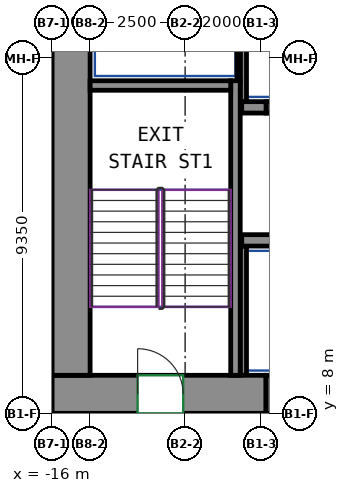
"""IFC4 building model, lengths in metres.
Left out: names, types, materials, properties, quantities, classifications, styles, units other than length and angle.
Written with IfcOpenShell. Run it as: python <this file> out.ifc"""

import sys

from ifc_helpers import new_model, si_unit, direction, frame, frame_2d, origin, place, context, subcontext, project, spatial, rectangle, extrude, source, transform, mapped, element, fill, save


model = new_model("IFC4")
c1 = context("Model", 3, precision=1e-05, world=origin(), true_north=direction((0.0, 1.0)))
c2 = subcontext(c1, "Body", "Model", "MODEL_VIEW")
j1 = project(units=[si_unit("LENGTHUNIT", "METRE"), si_unit("PLANEANGLEUNIT", "RADIAN")], contexts=[c1])
p1 = place(None, origin())
s1 = spatial("IfcSite", under=j1, at=p1, CompositionType="ELEMENT")
p2 = place(p1, origin())
s2 = spatial("IfcBuilding", under=s1, at=p2, CompositionType="ELEMENT")
p3 = place(p2, frame((0.0, 0.0, 71.2)))
s3 = spatial("IfcBuildingStorey", under=s2, at=p3, CompositionType="ELEMENT", Elevation=71.2)
m1 = source(origin(), c2, "Body", "SweptSolid", [
    extrude(rectangle(XDim=5.63, YDim=1.0, at=frame_2d((2.815, 0.0))), origin(), (0.0, 0.0, 1.0), 3.72),
])
p4 = place(p3, frame((-16.0, 8.5, 0.0), z_axis=(0.0, 0.0, 1.0), x_axis=(1.0, 0.0, 0.0)))
e1 = element("IfcWall", 1, at=p4, inside=s3, PredefinedType="SHEAR", context=c2, shape_type="MappedRepresentation", body=[
    mapped(m1, transform((0.0, 0.0, 0.0))),
])
p5 = place(p4, frame((2.25, 0.0, 0.0)))
e2 = element("IfcOpeningElement", 2, at=p5, cuts=e1, PredefinedType="OPENING", context=c2, shape_type="SweptSolid", body=[
    extrude(rectangle(XDim=1.2, YDim=2.1, at=frame_2d((0.6, 1.05))), frame((0.0, 0.51, 0.0), z_axis=(0.0, -1.0, 0.0), x_axis=(1.0, 0.0, 0.0)), (0.0, 0.0, 1.0), 1.02),
])
m2 = source(origin(), c2, "Body", "SweptSolid", [
    extrude(rectangle(XDim=12.0, YDim=1.0, at=frame_2d((6.0, 0.0))), origin(), (0.0, 0.0, 1.0), 3.72),
])
p6 = place(p3, frame((-15.5, 9.0, 0.0), z_axis=(0.0, 0.0, 1.0), x_axis=(0.0, 1.0, 0.0)))
e3 = element("IfcWall", 3, at=p6, inside=s3, PredefinedType="SHEAR", context=c2, shape_type="MappedRepresentation", body=[
    mapped(m2, transform((0.0, 0.0, 0.0))),
])
m3 = source(origin(), c2, "Body", "SweptSolid", [
    extrude(rectangle(XDim=7.75, YDim=0.25, at=frame_2d((3.875, 0.0))), origin(), (0.0, 0.0, 1.0), 3.72),
])
p7 = place(p3, frame((-11.175, 9.0, 0.0), z_axis=(0.0, 0.0, 1.0), x_axis=(0.0, 1.0, 0.0)))
e4 = element("IfcWall", 4, at=p7, inside=s3, PredefinedType="SHEAR", context=c2, shape_type="MappedRepresentation", body=[
    mapped(m3, transform((0.0, 0.0, 0.0))),
])
m4 = source(origin(), c2, "Body", "SweptSolid", [
    extrude(rectangle(XDim=3.7, YDim=0.25, at=frame_2d((1.85, 0.0))), origin(), (0.0, 0.0, 1.0), 3.72),
])
p8 = place(p3, frame((-15.0, 16.625, 0.0), z_axis=(0.0, 0.0, 1.0), x_axis=(1.0, 0.0, 0.0)))
e5 = element("IfcWall", 5, at=p8, inside=s3, PredefinedType="SHEAR", context=c2, shape_type="MappedRepresentation", body=[
    mapped(m4, transform((0.0, 0.0, 0.0))),
])
m5 = source(origin(), c2, "Body", "SweptSolid", [
    extrude(rectangle(XDim=6.0, YDim=0.3, at=frame_2d((3.0, 0.0))), origin(), (0.0, 0.0, 1.0), 3.72),
])
p9 = place(p3, frame((-11.01, 12.55, 0.0), z_axis=(0.0, 0.0, 1.0), x_axis=(1.0, 0.0, 0.0)))
e6 = element("IfcWall", 6, at=p9, inside=s3, PredefinedType="SHEAR", context=c2, shape_type="MappedRepresentation", body=[
    mapped(m5, transform((0.0, 0.0, 0.0))),
])
m6 = source(origin(), c2, "Body", "SweptSolid", [
    extrude(rectangle(XDim=0.64, YDim=0.3, at=frame_2d((0.32, 0.0))), origin(), (0.0, 0.0, 1.0), 3.72),
])
p10 = place(p3, frame((-11.01, 16.05, 0.0), z_axis=(0.0, 0.0, 1.0), x_axis=(1.0, 0.0, 0.0)))
e7 = element("IfcWall", 7, at=p10, inside=s3, PredefinedType="SHEAR", context=c2, shape_type="MappedRepresentation", body=[
    mapped(m6, transform((0.0, 0.0, 0.0))),
])
m7 = source(origin(), c2, "Body", "SweptSolid", [
    extrude(rectangle(XDim=1.4, YDim=0.3, at=frame_2d((0.7, 0.0))), origin(), (0.0, 0.0, 1.0), 3.72),
])
p11 = place(p3, frame((-10.37, 16.05, 0.0), z_axis=(0.0, 0.0, 1.0), x_axis=(1.0, 0.0, 0.0)))
e8 = element("IfcWall", 8, at=p11, inside=s3, PredefinedType="PARTITIONING", context=c2, shape_type="MappedRepresentation", body=[
    mapped(m7, transform((0.0, 0.0, 0.0))),
])
p12 = place(p11, frame((0.15, 0.0, 0.0)))
e9 = element("IfcOpeningElement", 9, at=p12, cuts=e8, PredefinedType="OPENING", context=c2, shape_type="SweptSolid", body=[
    extrude(rectangle(XDim=1.1, YDim=2.1, at=frame_2d((0.55, 1.05))), frame((0.0, 0.16, 0.0), z_axis=(0.0, -1.0, 0.0), x_axis=(1.0, 0.0, 0.0)), (0.0, 0.0, 1.0), 0.32),
])
m8 = source(origin(), c2, "Body", "SweptSolid", [
    extrude(rectangle(XDim=3.275, YDim=0.165, at=frame_2d((1.638, 0.0))), origin(), (0.0, 0.0, 1.0), 3.72),
])
p13 = place(p3, frame((-10.968, 16.2, 0.0), z_axis=(0.0, 0.0, 1.0), x_axis=(0.0, 1.0, 0.0)))
e10 = element("IfcWall", 10, at=p13, inside=s3, PredefinedType="PARTITIONING", context=c2, shape_type="MappedRepresentation", body=[
    mapped(m8, transform((0.0, 0.0, 0.0))),
])
m9 = source(origin(), c2, "Body", "SweptSolid", [
    extrude(rectangle(XDim=2.725, YDim=0.085, at=frame_2d((1.363, 0.0))), origin(), (0.0, 0.0, 1.0), 3.72),
])
p14 = place(p3, frame((-11.093, 16.75, 0.0), z_axis=(0.0, 0.0, 1.0), x_axis=(0.0, 1.0, 0.0)))
e11 = element("IfcWall", 11, at=p14, inside=s3, PredefinedType="PARTITIONING", context=c2, shape_type="MappedRepresentation", body=[
    mapped(m9, transform((0.0, 0.0, 0.0))),
])
m10 = source(origin(), c2, "Body", "SweptSolid", [
    extrude(rectangle(XDim=3.4, YDim=0.165, at=frame_2d((1.7, 0.0))), origin(), (0.0, 0.0, 1.0), 3.72),
])
p15 = place(p3, frame((-10.968, 9.0, 0.0), z_axis=(0.0, 0.0, 1.0), x_axis=(0.0, 1.0, 0.0)))
e12 = element("IfcWall", 12, at=p15, inside=s3, PredefinedType="PARTITIONING", context=c2, shape_type="MappedRepresentation", body=[
    mapped(m10, transform((0.0, 0.0, 0.0))),
])
m11 = source(origin(), c2, "Body", "SweptSolid", [
    extrude(rectangle(XDim=1.4, YDim=1.0, at=frame_2d((0.7, 0.0))), origin(), (0.0, 0.0, 1.0), 2.7),
])
p16 = place(p3, frame((-10.37, 8.5, 0.0), z_axis=(0.0, 0.0, 1.0), x_axis=(1.0, 0.0, 0.0)))
e13 = element("IfcWall", 13, at=p16, inside=s3, PredefinedType="PARTITIONING", context=c2, shape_type="MappedRepresentation", body=[
    mapped(m11, transform((0.0, 0.0, 0.0))),
])
p17 = place(p16, frame((0.25, 0.0, 0.0)))
e14 = element("IfcOpeningElement", 14, at=p17, cuts=e13, PredefinedType="OPENING", context=c2, shape_type="SweptSolid", body=[
    extrude(rectangle(XDim=0.9, YDim=2.1, at=frame_2d((0.45, 1.05))), frame((0.0, 0.51, 0.0), z_axis=(0.0, -1.0, 0.0), x_axis=(1.0, 0.0, 0.0)), (0.0, 0.0, 1.0), 1.02),
])
p18 = place(p5, origin())
e15 = element("IfcDoor", 15, at=p18, inside=s3, OperationType="DOUBLE_DOOR_SINGLE_SWING", PredefinedType="DOOR", context=c2, shape_type="SweptSolid", body=[
    extrude(rectangle(XDim=1.2, YDim=2.1, at=frame_2d((0.6, 1.05))), frame((0.0, 0.405, 0.0), z_axis=(0.0, -1.0, 0.0), x_axis=(1.0, 0.0, 0.0)), (0.0, 0.0, 1.0), 0.05),
])
fill(e2, e15)
save(model, sys.argv[1])
